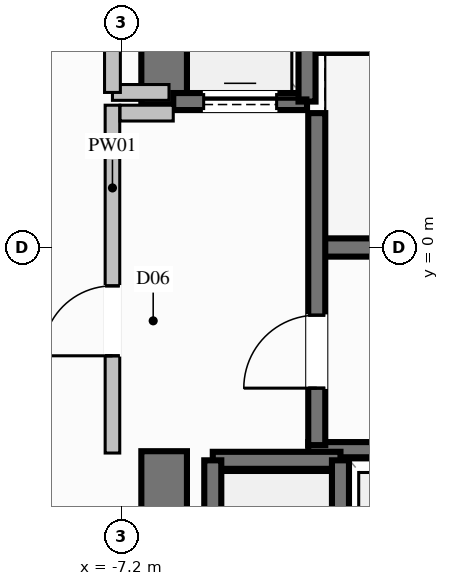
"""IFC4 building model, lengths in metres.
Left out: names, types, materials, properties, quantities, classifications, styles, units other than length and angle.
Written with IfcOpenShell. Run it as: python <this file> out.ifc"""

import sys

from ifc_helpers import new_model, si_unit, direction, frame, frame_2d, origin, place, context, subcontext, project, spatial, rectangle, extrude, element, fill, save


model = new_model("IFC4")
c1 = context("Model", 3, precision=1e-05, world=origin(), true_north=direction((0.0, 1.0)))
c2 = subcontext(c1, "Body", "Model", "MODEL_VIEW")
j1 = project(units=[si_unit("LENGTHUNIT", "METRE"), si_unit("PLANEANGLEUNIT", "RADIAN")], contexts=[c1])
p1 = place(None, origin())
s1 = spatial("IfcSite", under=j1, at=p1, CompositionType="ELEMENT")
p2 = place(p1, origin())
s2 = spatial("IfcBuilding", under=s1, at=p2, CompositionType="ELEMENT")
p3 = place(p2, frame((0.0, 0.0, 32.0)))
s3 = spatial("IfcBuildingStorey", under=s2, at=p3, CompositionType="ELEMENT", Elevation=32.0)
p4 = place(p3, frame((-3.99, 0.0, 0.0), z_axis=(0.0, 0.0, 1.0), x_axis=(1.0, 0.0, 0.0)))
e1 = element("IfcWall", 1, at=p4, inside=s3, PredefinedType="SHEAR", context=c2, shape_type="SweptSolid", body=[
    extrude(rectangle(XDim=7.98, YDim=0.3, at=frame_2d((3.99, 0.0))), origin(), (0.0, 0.0, 1.0), 3.6),
])
for number, where, z_axis, x_axis in (
    (2, (-4.13, -3.325, 0.0), (0.0, 0.0, 1.0), (1.0, 0.0, 0.0)),
    (3, (-4.13, 3.325, 0.0), (0.0, 0.0, 1.0), (1.0, 0.0, 0.0)),
):
    element("IfcWall", number, at=place(p3, frame(where, z_axis=z_axis, x_axis=x_axis)), inside=s3, PredefinedType="SOLIDWALL", context=c2, shape_type="SweptSolid", body=[
        extrude(rectangle(XDim=8.26, YDim=0.25, at=frame_2d((4.13, 0.0))), origin(), (0.0, 0.0, 1.0), 3.6),
    ])
p5 = place(p3, frame((-6.5, 2.35, 0.0), z_axis=(0.0, 0.0, 1.0), x_axis=(0.0, 1.0, 0.0)))
e4 = element("IfcWall", 4, at=p5, inside=s3, PredefinedType="SHEAR", context=c2, shape_type="SweptSolid", body=[
    extrude(rectangle(XDim=4.125, YDim=0.75, at=frame_2d((2.062, 0.0))), origin(), (0.0, 0.0, 1.0), 3.6),
])
p6 = place(p3, frame((-6.5, -6.475, 0.0), z_axis=(0.0, 0.0, 1.0), x_axis=(0.0, 1.0, 0.0)))
e5 = element("IfcWall", 5, at=p6, inside=s3, PredefinedType="SHEAR", context=c2, shape_type="SweptSolid", body=[
    extrude(rectangle(XDim=3.125, YDim=0.75, at=frame_2d((1.562, 0.0))), origin(), (0.0, 0.0, 1.0), 3.6),
])
p7 = place(p3, frame((-3.6, -3.5, 0.0), z_axis=(0.0, 0.0, 1.0), x_axis=(-1.0, 0.0, 0.0)))
e6 = element("IfcWall", 6, at=p7, inside=s3, PredefinedType="SOLIDWALL", context=c2, shape_type="SweptSolid", body=[
    extrude(rectangle(XDim=2.1, YDim=0.28, at=frame_2d((1.05, 0.0))), origin(), (0.0, 0.0, 1.0), 3.34),
])
for number, where, z_axis, x_axis in (
    (7, (-5.7, -3.5, 0.0), (0.0, 0.0, 1.0), (0.0, -1.0, 0.0)),
    (8, (-3.6, -6.0, 0.0), (0.0, 0.0, 1.0), (0.0, 1.0, 0.0)),
):
    element("IfcWall", number, at=place(p3, frame(where, z_axis=z_axis, x_axis=x_axis)), inside=s3, PredefinedType="SOLIDWALL", context=c2, shape_type="SweptSolid", body=[
        extrude(rectangle(XDim=2.5, YDim=0.28, at=frame_2d((1.25, 0.0))), origin(), (0.0, 0.0, 1.0), 3.34),
    ])
p8 = place(p3, frame((-6.35, 2.4, 0.0), z_axis=(0.0, 0.0, 1.0), x_axis=(1.0, 0.0, 0.0)))
e9 = element("IfcWall", 9, at=p8, inside=s3, PredefinedType="SOLIDWALL", context=c2, shape_type="SweptSolid", body=[
    extrude(rectangle(XDim=2.2, YDim=0.28, at=frame_2d((1.1, 0.0))), origin(), (0.0, 0.0, 1.0), 3.34),
])
p9 = place(p8, frame((0.5, 0.0, 0.0)))
e10 = element("IfcOpeningElement", 10, at=p9, cuts=e9, PredefinedType="OPENING", context=c2, shape_type="SweptSolid", body=[
    extrude(rectangle(XDim=1.2, YDim=2.2, at=frame_2d((0.6, 1.1))), frame((0.0, 0.15, 0.0), z_axis=(0.0, -1.0, 0.0), x_axis=(1.0, 0.0, 0.0)), (0.0, 0.0, 1.0), 0.3),
])
p10 = place(p3, frame((-4.15, 2.4, 0.0), z_axis=(0.0, 0.0, 1.0), x_axis=(0.0, 1.0, 0.0)))
e11 = element("IfcWall", 11, at=p10, inside=s3, PredefinedType="SOLIDWALL", context=c2, shape_type="SweptSolid", body=[
    extrude(rectangle(XDim=2.7, YDim=0.28, at=frame_2d((1.35, 0.0))), origin(), (0.0, 0.0, 1.0), 3.34),
])
p11 = place(p3, frame((-3.99, -3.25, 0.0), z_axis=(0.0, 0.0, 1.0), x_axis=(0.0, 1.0, 0.0)))
e12 = element("IfcWall", 12, at=p11, inside=s3, PredefinedType="SOLIDWALL", context=c2, shape_type="SweptSolid", body=[
    extrude(rectangle(XDim=5.46, YDim=0.28, at=frame_2d((2.73, 0.0))), origin(), (0.0, 0.0, 1.0), 3.34),
])
p12 = place(p11, frame((0.937, 0.0, 0.0)))
e13 = element("IfcOpeningElement", 13, at=p12, cuts=e12, PredefinedType="OPENING", context=c2, shape_type="SweptSolid", body=[
    extrude(rectangle(XDim=1.2, YDim=2.2, at=frame_2d((0.6, 1.1))), frame((0.0, 0.15, 0.0), z_axis=(0.0, -1.0, 0.0), x_axis=(1.0, 0.0, 0.0)), (0.0, 0.0, 1.0), 0.3),
])
p13 = place(p3, frame((-7.35, -3.38, 0.0), z_axis=(0.0, 0.0, 1.0), x_axis=(0.0, 1.0, 0.0)))
e14 = element("IfcWall", 14, at=p13, inside=s3, PredefinedType="PARTITIONING", context=c2, shape_type="SweptSolid", body=[
    extrude(rectangle(XDim=5.72, YDim=0.24, at=frame_2d((2.86, 0.0))), origin(), (0.0, 0.0, 1.0), 2.425),
])
p14 = place(p13, frame((1.599, 0.0, 0.0)))
e15 = element("IfcOpeningElement", 15, at=p14, cuts=e14, PredefinedType="OPENING", context=c2, shape_type="SweptSolid", body=[
    extrude(rectangle(XDim=1.15, YDim=2.2, at=frame_2d((0.575, 1.1))), frame((0.0, 0.13, 0.0), z_axis=(0.0, -1.0, 0.0), x_axis=(1.0, 0.0, 0.0)), (0.0, 0.0, 1.0), 0.26),
])
p15 = place(p3, frame((-7.225, 2.21, 0.0), z_axis=(0.0, 0.0, 1.0), x_axis=(1.0, 0.0, 0.0)))
e16 = element("IfcWall", 16, at=p15, inside=s3, PredefinedType="PARTITIONING", context=c2, shape_type="SweptSolid", body=[
    extrude(rectangle(XDim=0.875, YDim=0.26, at=frame_2d((0.438, 0.0))), origin(), (0.0, 0.0, 1.0), 3.34),
])
p16 = place(p3, frame((-7.35, 2.55, 0.0), z_axis=(0.0, 0.0, 1.0), x_axis=(1.0, 0.0, 0.0)))
e17 = element("IfcWall", 17, at=p16, inside=s3, PredefinedType="PARTITIONING", context=c2, shape_type="SweptSolid", body=[
    extrude(rectangle(XDim=0.93, YDim=0.26, at=frame_2d((0.465, 0.0))), origin(), (0.0, 0.0, 1.0), 3.34),
])
p17 = place(p3, frame((-7.35, 2.55, 0.0), z_axis=(0.0, 0.0, 1.0), x_axis=(0.0, 1.0, 0.0)))
e18 = element("IfcWall", 18, at=p17, inside=s3, PredefinedType="PARTITIONING", context=c2, shape_type="SweptSolid", body=[
    extrude(rectangle(XDim=2.4, YDim=0.26, at=frame_2d((1.2, 0.0))), origin(), (0.0, 0.0, 1.0), 2.425),
])
p18 = place(p17, frame((0.775, 0.0, 0.0)))
e19 = element("IfcOpeningElement", 19, at=p18, cuts=e18, PredefinedType="OPENING", context=c2, shape_type="SweptSolid", body=[
    extrude(rectangle(XDim=0.85, YDim=2.05, at=frame_2d((0.425, 1.025))), frame((0.0, 0.14, 0.0), z_axis=(0.0, -1.0, 0.0), x_axis=(1.0, 0.0, 0.0)), (0.0, 0.0, 1.0), 0.28),
])
p19 = place(p9, origin())
e20 = element("IfcDoor", 20, at=p19, inside=s3, OperationType="SLIDING_TO_LEFT", PredefinedType="DOOR", context=c2, shape_type="SweptSolid", body=[
    extrude(rectangle(XDim=1.2, YDim=2.2, at=frame_2d((0.6, 1.1))), frame((0.0, 0.025, 0.0), z_axis=(0.0, -1.0, 0.0), x_axis=(1.0, 0.0, 0.0)), (0.0, 0.0, 1.0), 0.05),
])
fill(e10, e20)
p20 = place(p12, origin())
e21 = element("IfcDoor", 21, at=p20, inside=s3, OperationType="SINGLE_SWING_LEFT", PredefinedType="DOOR", context=c2, shape_type="SweptSolid", body=[
    extrude(rectangle(XDim=1.2, YDim=2.2, at=frame_2d((0.6, 1.1))), frame((0.0, 0.025, 0.0), z_axis=(0.0, -1.0, 0.0), x_axis=(1.0, 0.0, 0.0)), (0.0, 0.0, 1.0), 0.05),
])
fill(e13, e21)
p21 = place(p14, origin())
e22 = element("IfcDoor", 22, at=p21, inside=s3, OperationType="SINGLE_SWING_LEFT", PredefinedType="DOOR", context=c2, shape_type="SweptSolid", body=[
    extrude(rectangle(XDim=1.15, YDim=2.2, at=frame_2d((0.575, 1.1))), frame((0.0, 0.025, 0.0), z_axis=(0.0, -1.0, 0.0), x_axis=(1.0, 0.0, 0.0)), (0.0, 0.0, 1.0), 0.05),
])
fill(e15, e22)
save(model, sys.argv[1])
